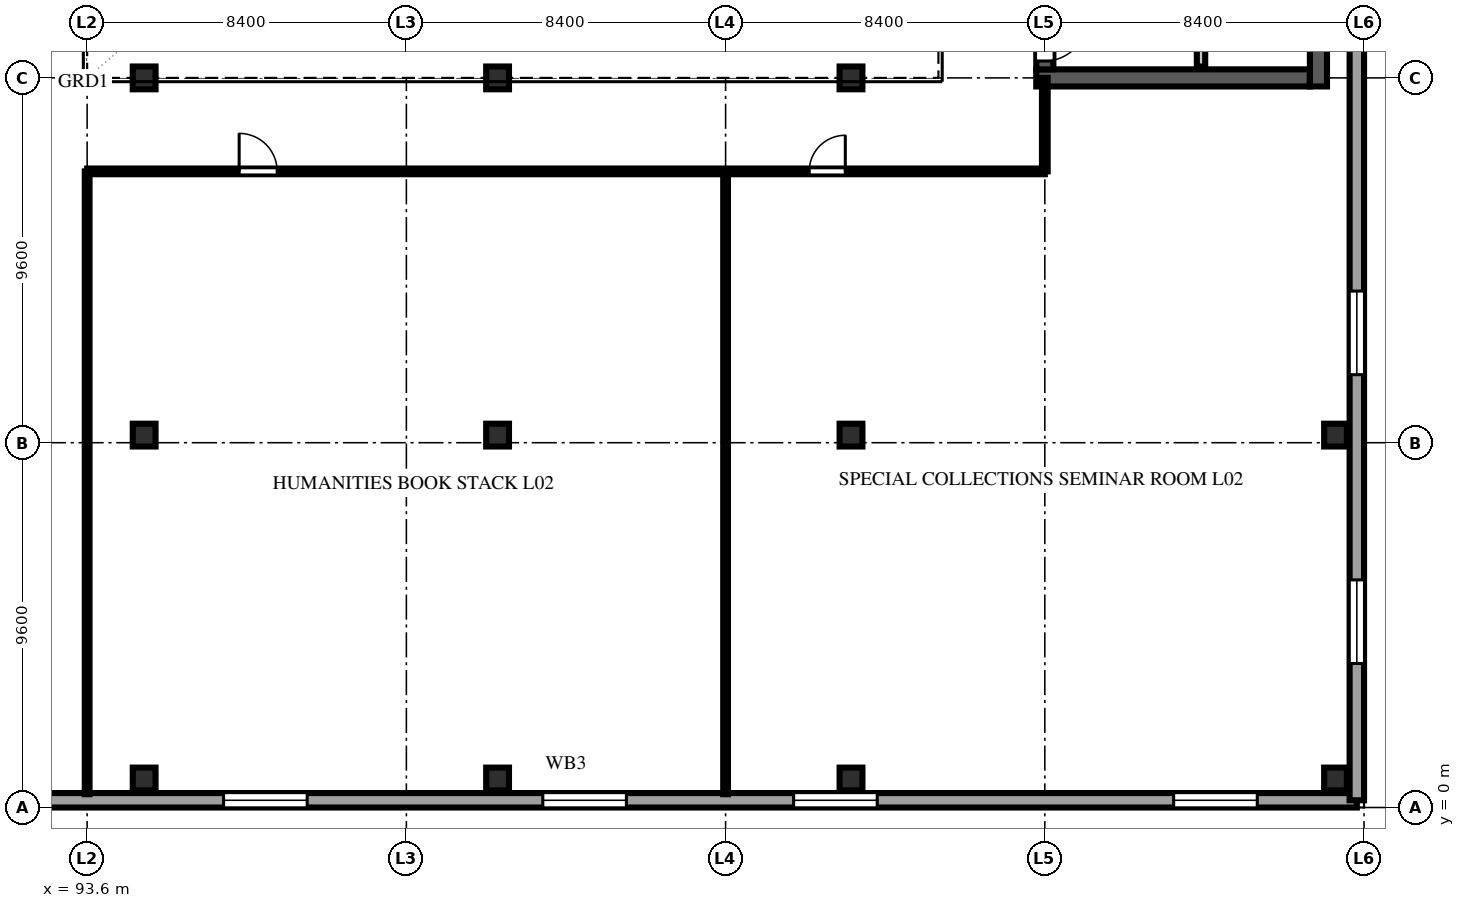
"""IFC4 building model, lengths in metres.
Left out: names, types, materials, properties, quantities, classifications, styles, units other than length and angle.
Written with IfcOpenShell. Run it as: python <this file> out.ifc"""

import sys

from ifc_helpers import new_model, si_unit, direction, frame, frame_2d, origin, origin_2d, place, context, subcontext, project, spatial, rectangle, extrude, element, fill, save


model = new_model("IFC4")
c1 = context("Model", 3, precision=1e-05, world=origin(), true_north=direction((0.0, 1.0)))
c2 = subcontext(c1, "Body", "Model", "MODEL_VIEW")
j1 = project(units=[si_unit("LENGTHUNIT", "METRE"), si_unit("PLANEANGLEUNIT", "RADIAN")], contexts=[c1])
p1 = place(None, origin())
s1 = spatial("IfcSite", under=j1, at=p1, CompositionType="ELEMENT")
p2 = place(p1, origin())
s2 = spatial("IfcBuilding", under=s1, at=p2, CompositionType="ELEMENT")
p3 = place(p2, frame((0.0, 0.0, 10.4)))
s3 = spatial("IfcBuildingStorey", under=s2, at=p3, CompositionType="ELEMENT", Elevation=10.4)
p4 = place(p3, frame((118.575, 19.2, 0.0), z_axis=(0.0, 0.0, 1.0), x_axis=(1.0, 0.0, 0.0)))
e1 = element("IfcWall", 1, at=p4, inside=s3, PredefinedType="SHEAR", context=c2, shape_type="SweptSolid", body=[
    extrude(rectangle(XDim=7.2, YDim=0.45, at=frame_2d((3.6, 0.0))), origin(), (0.0, 0.0, 1.0), 4.25),
])
p5 = place(p3, frame((126.0, 18.975, 0.0), z_axis=(0.0, 0.0, 1.0), x_axis=(0.0, 1.0, 0.0)))
e2 = element("IfcWall", 2, at=p5, inside=s3, PredefinedType="SHEAR", context=c2, shape_type="SweptSolid", body=[
    extrude(rectangle(XDim=19.65, YDim=0.45, at=frame_2d((9.825, 0.0))), origin(), (0.0, 0.0, 1.0), 4.25),
])
p6 = place(p3, frame((118.8, 19.425, 0.0), z_axis=(0.0, 0.0, 1.0), x_axis=(0.0, 1.0, 0.0)))
e3 = element("IfcWall", 3, at=p6, inside=s3, PredefinedType="SHEAR", context=c2, shape_type="SweptSolid", body=[
    extrude(rectangle(XDim=8.575, YDim=0.45, at=frame_2d((4.288, 0.0))), origin(), (0.0, 0.0, 1.0), 4.25),
])
p7 = place(p6, frame((0.22, 0.0, 0.0)))
e4 = element("IfcOpeningElement", 4, at=p7, cuts=e3, PredefinedType="OPENING", context=c2, shape_type="SweptSolid", body=[
    extrude(rectangle(XDim=1.1, YDim=2.2, at=frame_2d((0.55, 1.1))), frame((0.0, 0.237, 0.0), z_axis=(0.0, -1.0, 0.0), x_axis=(1.0, 0.0, 0.0)), (0.0, 0.0, 1.0), 0.474),
])
for number, where, z_axis, x_axis in (
    (5, (95.1, 0.75, 0.0), (0.0, 0.0, 1.0), (1.0, 0.0, 0.0)),
    (6, (95.1, 9.8, 0.0), (0.0, 0.0, 1.0), (1.0, 0.0, 0.0)),
    (7, (95.1, 19.2, 0.0), (0.0, 0.0, 1.0), (1.0, 0.0, 0.0)),
    (8, (104.4, 0.75, 0.0), (0.0, 0.0, 1.0), (1.0, 0.0, 0.0)),
    (9, (104.4, 9.8, 0.0), (0.0, 0.0, 1.0), (1.0, 0.0, 0.0)),
    (10, (104.4, 19.2, 0.0), (0.0, 0.0, 1.0), (1.0, 0.0, 0.0)),
    (11, (113.7, 0.75, 0.0), (0.0, 0.0, 1.0), (1.0, 0.0, 0.0)),
    (12, (113.7, 9.8, 0.0), (0.0, 0.0, 1.0), (1.0, 0.0, 0.0)),
    (13, (113.7, 19.2, 0.0), (0.0, 0.0, 1.0), (1.0, 0.0, 0.0)),
    (14, (126.45, 0.75, 0.0), (0.0, 0.0, 1.0), (1.0, 0.0, 0.0)),
    (15, (126.45, 9.8, 0.0), (0.0, 0.0, 1.0), (1.0, 0.0, 0.0)),
):
    element("IfcColumn", number, at=place(p3, frame(where, z_axis=z_axis, x_axis=x_axis)), inside=s3, PredefinedType="COLUMN", context=c2, shape_type="SweptSolid", body=[
        extrude(rectangle(XDim=0.6, YDim=0.6, at=origin_2d()), origin(), (0.0, 0.0, 1.0), 4.6),
    ])
p8 = place(p3, frame((85.39, 0.19, 0.0), z_axis=(0.0, 0.0, 1.0), x_axis=(1.0, 0.0, 0.0)))
e16 = element("IfcWall", 16, at=p8, inside=s3, PredefinedType="SOLIDWALL", context=c2, shape_type="SweptSolid", body=[
    extrude(rectangle(XDim=41.62, YDim=0.38, at=frame_2d((20.81, 0.0))), origin(), (0.0, 0.0, 1.0), 4.25),
])
p9 = place(p8, frame((5.0, 0.0, 0.85)))
e17 = element("IfcOpeningElement", 17, at=p9, cuts=e16, PredefinedType="OPENING", context=c2, shape_type="SweptSolid", body=[
    extrude(rectangle(XDim=2.2, YDim=2.25, at=frame_2d((1.1, 1.125))), frame((0.0, 0.202, 0.0), z_axis=(0.0, -1.0, 0.0), x_axis=(1.0, 0.0, 0.0)), (0.0, 0.0, 1.0), 0.404),
])
p10 = place(p8, frame((11.8, 0.0, 0.85)))
e18 = element("IfcOpeningElement", 18, at=p10, cuts=e16, PredefinedType="OPENING", context=c2, shape_type="SweptSolid", body=[
    extrude(rectangle(XDim=2.2, YDim=2.25, at=frame_2d((1.1, 1.125))), frame((0.0, 0.202, 0.0), z_axis=(0.0, -1.0, 0.0), x_axis=(1.0, 0.0, 0.0)), (0.0, 0.0, 1.0), 0.404),
])
p11 = place(p8, frame((20.2, 0.0, 0.85)))
e19 = element("IfcOpeningElement", 19, at=p11, cuts=e16, PredefinedType="OPENING", context=c2, shape_type="SweptSolid", body=[
    extrude(rectangle(XDim=2.2, YDim=2.25, at=frame_2d((1.1, 1.125))), frame((0.0, 0.202, 0.0), z_axis=(0.0, -1.0, 0.0), x_axis=(1.0, 0.0, 0.0)), (0.0, 0.0, 1.0), 0.404),
])
p12 = place(p8, frame((26.8, 0.0, 0.85)))
e20 = element("IfcOpeningElement", 20, at=p12, cuts=e16, PredefinedType="OPENING", context=c2, shape_type="SweptSolid", body=[
    extrude(rectangle(XDim=2.2, YDim=2.25, at=frame_2d((1.1, 1.125))), frame((0.0, 0.202, 0.0), z_axis=(0.0, -1.0, 0.0), x_axis=(1.0, 0.0, 0.0)), (0.0, 0.0, 1.0), 0.404),
])
p13 = place(p8, frame((36.8, 0.0, 0.85)))
e21 = element("IfcOpeningElement", 21, at=p13, cuts=e16, PredefinedType="OPENING", context=c2, shape_type="SweptSolid", body=[
    extrude(rectangle(XDim=2.2, YDim=2.25, at=frame_2d((1.1, 1.125))), frame((0.0, 0.202, 0.0), z_axis=(0.0, -1.0, 0.0), x_axis=(1.0, 0.0, 0.0)), (0.0, 0.0, 1.0), 0.404),
])
p14 = place(p3, frame((127.01, 0.19, 0.0), z_axis=(0.0, 0.0, 1.0), x_axis=(0.0, 1.0, 0.0)))
e22 = element("IfcWall", 22, at=p14, inside=s3, PredefinedType="SOLIDWALL", context=c2, shape_type="SweptSolid", body=[
    extrude(rectangle(XDim=57.22, YDim=0.38, at=frame_2d((28.61, 0.0))), origin(), (0.0, 0.0, 1.0), 4.25),
])
p15 = place(p14, frame((3.6, 0.0, 0.85)))
e23 = element("IfcOpeningElement", 23, at=p15, cuts=e22, PredefinedType="OPENING", context=c2, shape_type="SweptSolid", body=[
    extrude(rectangle(XDim=2.2, YDim=2.25, at=frame_2d((1.1, 1.125))), frame((0.0, 0.202, 0.0), z_axis=(0.0, -1.0, 0.0), x_axis=(1.0, 0.0, 0.0)), (0.0, 0.0, 1.0), 0.404),
])
p16 = place(p14, frame((11.2, 0.0, 0.85)))
e24 = element("IfcOpeningElement", 24, at=p16, cuts=e22, PredefinedType="OPENING", context=c2, shape_type="SweptSolid", body=[
    extrude(rectangle(XDim=2.2, YDim=2.25, at=frame_2d((1.1, 1.125))), frame((0.0, 0.202, 0.0), z_axis=(0.0, -1.0, 0.0), x_axis=(1.0, 0.0, 0.0)), (0.0, 0.0, 1.0), 0.404),
])
p17 = place(p14, frame((41.6, 0.0, 0.85)))
e25 = element("IfcOpeningElement", 25, at=p17, cuts=e22, PredefinedType="OPENING", context=c2, shape_type="SweptSolid", body=[
    extrude(rectangle(XDim=2.2, YDim=2.25, at=frame_2d((1.1, 1.125))), frame((0.0, 0.202, 0.0), z_axis=(0.0, -1.0, 0.0), x_axis=(1.0, 0.0, 0.0)), (0.0, 0.0, 1.0), 0.404),
])
p18 = place(p14, frame((49.2, 0.0, 0.85)))
e26 = element("IfcOpeningElement", 26, at=p18, cuts=e22, PredefinedType="OPENING", context=c2, shape_type="SweptSolid", body=[
    extrude(rectangle(XDim=2.2, YDim=2.25, at=frame_2d((1.1, 1.125))), frame((0.0, 0.202, 0.0), z_axis=(0.0, -1.0, 0.0), x_axis=(1.0, 0.0, 0.0)), (0.0, 0.0, 1.0), 0.404),
])
p19 = place(p3, frame((122.91, 19.5, 0.0), z_axis=(0.0, 0.0, 1.0), x_axis=(0.0, 1.0, 0.0)))
e27 = element("IfcWall", 27, at=p19, inside=s3, PredefinedType="SOLIDWALL", context=c2, shape_type="SweptSolid", body=[
    extrude(rectangle(XDim=7.71, YDim=0.22, at=frame_2d((3.855, 0.0))), origin(), (0.0, 0.0, 1.0), 4.25),
])
for number, where, z_axis, x_axis in (
    (28, (93.6, 0.35, 0.0), (0.0, 0.0, 1.0), (0.0, 1.0, 0.0)),
    (29, (110.4, 0.35, 0.0), (0.0, 0.0, 1.0), (0.0, 1.0, 0.0)),
):
    element("IfcWall", number, at=place(p3, frame(where, z_axis=z_axis, x_axis=x_axis)), inside=s3, PredefinedType="PARTITIONING", context=c2, shape_type="SweptSolid", body=[
        extrude(rectangle(XDim=16.39, YDim=0.125, at=frame_2d((8.195, 0.0))), origin(), (0.0, 0.0, 1.0), 4.25),
    ])
p20 = place(p3, frame((118.8, 16.74, 0.0), z_axis=(0.0, 0.0, 1.0), x_axis=(0.0, 1.0, 0.0)))
e30 = element("IfcWall", 30, at=p20, inside=s3, PredefinedType="PARTITIONING", context=c2, shape_type="SweptSolid", body=[
    extrude(rectangle(XDim=2.46, YDim=0.15, at=frame_2d((1.23, 0.0))), origin(), (0.0, 0.0, 1.0), 4.25),
])
p21 = place(p3, frame((93.6, 16.74, 0.0), z_axis=(0.0, 0.0, 1.0), x_axis=(1.0, 0.0, 0.0)))
e31 = element("IfcWall", 31, at=p21, inside=s3, PredefinedType="PARTITIONING", context=c2, shape_type="SweptSolid", body=[
    extrude(rectangle(XDim=25.2, YDim=0.15, at=frame_2d((12.6, 0.0))), origin(), (0.0, 0.0, 1.0), 4.25),
])
p22 = place(p21, frame((4.0, 0.0, 0.0)))
e32 = element("IfcOpeningElement", 32, at=p22, cuts=e31, PredefinedType="OPENING", context=c2, shape_type="SweptSolid", body=[
    extrude(rectangle(XDim=1.0, YDim=2.2, at=frame_2d((0.5, 1.1))), frame((0.0, 0.087, 0.0), z_axis=(0.0, -1.0, 0.0), x_axis=(1.0, 0.0, 0.0)), (0.0, 0.0, 1.0), 0.174),
])
p23 = place(p21, frame((19.0, 0.0, 0.0)))
e33 = element("IfcOpeningElement", 33, at=p23, cuts=e31, PredefinedType="OPENING", context=c2, shape_type="SweptSolid", body=[
    extrude(rectangle(XDim=0.95, YDim=2.15, at=frame_2d((0.475, 1.075))), frame((0.0, 0.087, 0.0), z_axis=(0.0, -1.0, 0.0), x_axis=(1.0, 0.0, 0.0)), (0.0, 0.0, 1.0), 0.174),
])
p24 = place(p10, origin())
e34 = element("IfcWindow", 34, at=p24, inside=s3, PartitioningType="DOUBLE_PANEL_VERTICAL", PredefinedType="WINDOW", context=c2, shape_type="SweptSolid", body=[
    extrude(rectangle(XDim=2.2, YDim=2.25, at=frame_2d((1.1, 1.125))), frame((0.0, 0.11, 0.0), z_axis=(0.0, -1.0, 0.0), x_axis=(1.0, 0.0, 0.0)), (0.0, 0.0, 1.0), 0.06),
])
fill(e18, e34)
p25 = place(p11, origin())
e35 = element("IfcWindow", 35, at=p25, inside=s3, PartitioningType="DOUBLE_PANEL_VERTICAL", PredefinedType="WINDOW", context=c2, shape_type="SweptSolid", body=[
    extrude(rectangle(XDim=2.2, YDim=2.25, at=frame_2d((1.1, 1.125))), frame((0.0, 0.11, 0.0), z_axis=(0.0, -1.0, 0.0), x_axis=(1.0, 0.0, 0.0)), (0.0, 0.0, 1.0), 0.06),
])
fill(e19, e35)
p26 = place(p12, origin())
e36 = element("IfcWindow", 36, at=p26, inside=s3, PartitioningType="DOUBLE_PANEL_VERTICAL", PredefinedType="WINDOW", context=c2, shape_type="SweptSolid", body=[
    extrude(rectangle(XDim=2.2, YDim=2.25, at=frame_2d((1.1, 1.125))), frame((0.0, 0.11, 0.0), z_axis=(0.0, -1.0, 0.0), x_axis=(1.0, 0.0, 0.0)), (0.0, 0.0, 1.0), 0.06),
])
fill(e20, e36)
p27 = place(p13, origin())
e37 = element("IfcWindow", 37, at=p27, inside=s3, PartitioningType="DOUBLE_PANEL_VERTICAL", PredefinedType="WINDOW", context=c2, shape_type="SweptSolid", body=[
    extrude(rectangle(XDim=2.2, YDim=2.25, at=frame_2d((1.1, 1.125))), frame((0.0, 0.11, 0.0), z_axis=(0.0, -1.0, 0.0), x_axis=(1.0, 0.0, 0.0)), (0.0, 0.0, 1.0), 0.06),
])
fill(e21, e37)
p28 = place(p15, origin())
e38 = element("IfcWindow", 38, at=p28, inside=s3, PartitioningType="DOUBLE_PANEL_VERTICAL", PredefinedType="WINDOW", context=c2, shape_type="SweptSolid", body=[
    extrude(rectangle(XDim=2.2, YDim=2.25, at=frame_2d((1.1, 1.125))), frame((0.0, 0.11, 0.0), z_axis=(0.0, -1.0, 0.0), x_axis=(1.0, 0.0, 0.0)), (0.0, 0.0, 1.0), 0.06),
])
fill(e23, e38)
p29 = place(p16, origin())
e39 = element("IfcWindow", 39, at=p29, inside=s3, PartitioningType="DOUBLE_PANEL_VERTICAL", PredefinedType="WINDOW", context=c2, shape_type="SweptSolid", body=[
    extrude(rectangle(XDim=2.2, YDim=2.25, at=frame_2d((1.1, 1.125))), frame((0.0, 0.11, 0.0), z_axis=(0.0, -1.0, 0.0), x_axis=(1.0, 0.0, 0.0)), (0.0, 0.0, 1.0), 0.06),
])
fill(e24, e39)
p30 = place(p7, frame((1.1, 0.0, 0.0), z_axis=(0.0, 0.0, 1.0), x_axis=(-1.0, 0.0, 0.0)))
e40 = element("IfcDoor", 40, at=p30, inside=s3, OperationType="SINGLE_SWING_LEFT", PredefinedType="DOOR", context=c2, shape_type="SweptSolid", body=[
    extrude(rectangle(XDim=1.1, YDim=2.2, at=frame_2d((0.55, 1.1))), frame((0.0, 0.025, 0.0), z_axis=(0.0, -1.0, 0.0), x_axis=(1.0, 0.0, 0.0)), (0.0, 0.0, 1.0), 0.05),
])
fill(e4, e40)
p31 = place(p22, origin())
e41 = element("IfcDoor", 41, at=p31, inside=s3, OperationType="SINGLE_SWING_LEFT", PredefinedType="DOOR", context=c2, shape_type="SweptSolid", body=[
    extrude(rectangle(XDim=1.0, YDim=2.2, at=frame_2d((0.5, 1.1))), frame((0.0, 0.025, 0.0), z_axis=(0.0, -1.0, 0.0), x_axis=(1.0, 0.0, 0.0)), (0.0, 0.0, 1.0), 0.05),
])
fill(e32, e41)
p32 = place(p23, origin())
e42 = element("IfcDoor", 42, at=p32, inside=s3, OperationType="SINGLE_SWING_RIGHT", PredefinedType="DOOR", context=c2, shape_type="SweptSolid", body=[
    extrude(rectangle(XDim=0.95, YDim=2.15, at=frame_2d((0.475, 1.075))), frame((0.0, 0.025, 0.0), z_axis=(0.0, -1.0, 0.0), x_axis=(1.0, 0.0, 0.0)), (0.0, 0.0, 1.0), 0.05),
])
fill(e33, e42)
save(model, sys.argv[1])
